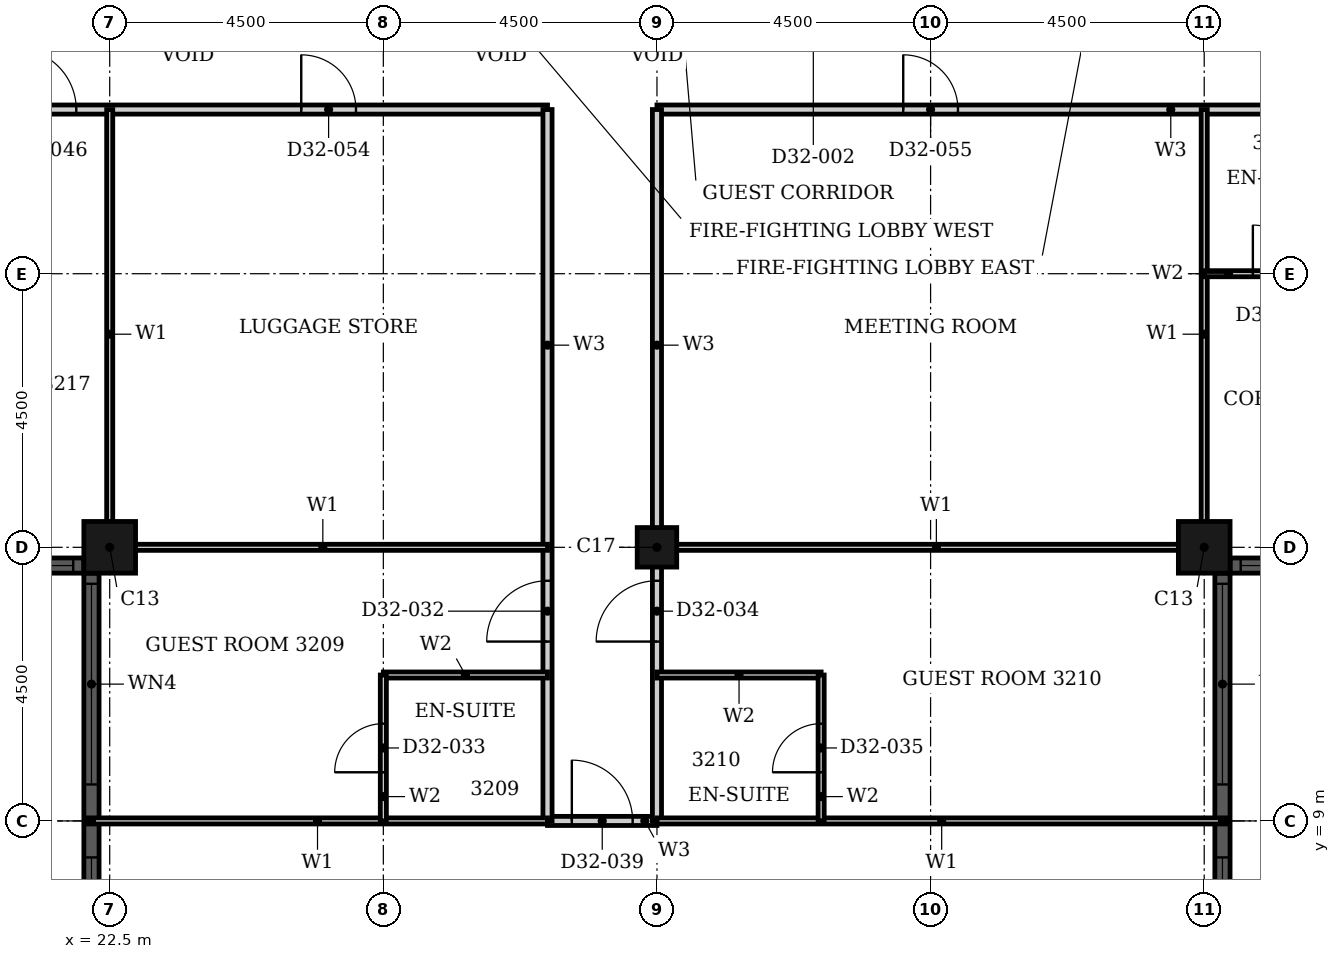
"""IFC4 building model, lengths in metres.
Left out: names, types, materials, properties, quantities, classifications, styles, units other than length and angle.
Written with IfcOpenShell. Run it as: python <this file> out.ifc"""

import sys

from ifc_helpers import new_model, si_unit, direction, frame, frame_2d, origin, origin_2d, place, context, subcontext, project, spatial, rectangle, hollow_rectangle, extrude, element, fill, save


model = new_model("IFC4")
c1 = context("Model", 3, precision=1e-05, world=origin(), true_north=direction((0.0, 1.0)))
c2 = subcontext(c1, "Body", "Model", "MODEL_VIEW")
j1 = project(units=[si_unit("LENGTHUNIT", "METRE"), si_unit("PLANEANGLEUNIT", "RADIAN")], contexts=[c1])
p1 = place(None, origin())
s1 = spatial("IfcSite", under=j1, at=p1, CompositionType="ELEMENT")
p2 = place(p1, origin())
s2 = spatial("IfcBuilding", under=s1, at=p2, CompositionType="ELEMENT")
p3 = place(p2, frame((0.0, 0.0, 129.6)))
s3 = spatial("IfcBuildingStorey", under=s2, at=p3, CompositionType="ELEMENT", Elevation=129.6)
for number, where, z_axis, x_axis in (
    (1, (40.5, 13.5, 0.0), (0.0, 0.0, 1.0), (1.0, 0.0, 0.0)),
    (2, (22.5, 13.5, 0.0), (0.0, 0.0, 1.0), (1.0, 0.0, 0.0)),
):
    element("IfcColumn", number, at=place(p3, frame(where, z_axis=z_axis, x_axis=x_axis)), inside=s3, PredefinedType="COLUMN", context=c2, shape_type="SweptSolid", body=[
        extrude(hollow_rectangle(XDim=0.85, YDim=0.85, WallThickness=0.026, at=origin_2d()), origin(), (0.0, 0.0, 1.0), 3.6),
    ])
p4 = place(p3, frame((31.5, 13.5, 0.0), z_axis=(0.0, 0.0, 1.0), x_axis=(1.0, 0.0, 0.0)))
e3 = element("IfcColumn", 3, at=p4, inside=s3, PredefinedType="COLUMN", context=c2, shape_type="SweptSolid", body=[
    extrude(hollow_rectangle(XDim=0.65, YDim=0.65, WallThickness=0.021, at=origin_2d()), origin(), (0.0, 0.0, 1.0), 3.6),
])
p5 = place(p3, frame((40.8, 4.925, 0.0), z_axis=(0.0, 0.0, 1.0), x_axis=(0.0, 1.0, 0.0)))
e4 = element("IfcWall", 4, at=p5, inside=s3, PredefinedType="SOLIDWALL", context=c2, shape_type="SweptSolid", body=[
    extrude(rectangle(XDim=8.15, YDim=0.25, at=frame_2d((4.075, 0.0))), origin(), (0.0, 0.0, 1.0), 3.6),
])
p6 = place(p5, frame((0.175, 0.0, 0.9)))
e5 = element("IfcOpeningElement", 5, at=p6, cuts=e4, PredefinedType="OPENING", context=c2, shape_type="SweptSolid", body=[
    extrude(rectangle(XDim=3.3, YDim=2.08, at=frame_2d((1.65, 1.04))), frame((0.0, 0.135, 0.0), z_axis=(0.0, -1.0, 0.0), x_axis=(1.0, 0.0, 0.0)), (0.0, 0.0, 1.0), 0.27),
])
p7 = place(p5, frame((4.675, 0.0, 0.9)))
e6 = element("IfcOpeningElement", 6, at=p7, cuts=e4, PredefinedType="OPENING", context=c2, shape_type="SweptSolid", body=[
    extrude(rectangle(XDim=3.3, YDim=2.08, at=frame_2d((1.65, 1.04))), frame((0.0, 0.135, 0.0), z_axis=(0.0, -1.0, 0.0), x_axis=(1.0, 0.0, 0.0)), (0.0, 0.0, 1.0), 0.27),
])
p8 = place(p3, frame((40.925, 13.2, 0.0), z_axis=(0.0, 0.0, 1.0), x_axis=(1.0, 0.0, 0.0)))
e7 = element("IfcWall", 7, at=p8, inside=s3, PredefinedType="SOLIDWALL", context=c2, shape_type="SweptSolid", body=[
    extrude(rectangle(XDim=3.65, YDim=0.25, at=frame_2d((1.825, 0.0))), origin(), (0.0, 0.0, 1.0), 3.6),
])
p9 = place(p8, frame((0.175, 0.0, 0.9)))
e8 = element("IfcOpeningElement", 8, at=p9, cuts=e7, PredefinedType="OPENING", context=c2, shape_type="SweptSolid", body=[
    extrude(rectangle(XDim=3.3, YDim=2.08, at=frame_2d((1.65, 1.04))), frame((0.0, 0.135, 0.0), z_axis=(0.0, -1.0, 0.0), x_axis=(1.0, 0.0, 0.0)), (0.0, 0.0, 1.0), 0.27),
])
p10 = place(p3, frame((18.425, 13.2, 0.0), z_axis=(0.0, 0.0, 1.0), x_axis=(1.0, 0.0, 0.0)))
e9 = element("IfcWall", 9, at=p10, inside=s3, PredefinedType="SOLIDWALL", context=c2, shape_type="SweptSolid", body=[
    extrude(rectangle(XDim=3.65, YDim=0.25, at=frame_2d((1.825, 0.0))), origin(), (0.0, 0.0, 1.0), 3.6),
])
p11 = place(p10, frame((0.175, 0.0, 0.9)))
e10 = element("IfcOpeningElement", 10, at=p11, cuts=e9, PredefinedType="OPENING", context=c2, shape_type="SweptSolid", body=[
    extrude(rectangle(XDim=3.3, YDim=2.08, at=frame_2d((1.65, 1.04))), frame((0.0, 0.135, 0.0), z_axis=(0.0, -1.0, 0.0), x_axis=(1.0, 0.0, 0.0)), (0.0, 0.0, 1.0), 0.27),
])
p12 = place(p3, frame((22.2, 13.075, 0.0), z_axis=(0.0, 0.0, 1.0), x_axis=(0.0, -1.0, 0.0)))
e11 = element("IfcWall", 11, at=p12, inside=s3, PredefinedType="SOLIDWALL", context=c2, shape_type="SweptSolid", body=[
    extrude(rectangle(XDim=8.15, YDim=0.25, at=frame_2d((4.075, 0.0))), origin(), (0.0, 0.0, 1.0), 3.6),
])
p13 = place(p12, frame((0.175, 0.0, 0.9)))
e12 = element("IfcOpeningElement", 12, at=p13, cuts=e11, PredefinedType="OPENING", context=c2, shape_type="SweptSolid", body=[
    extrude(rectangle(XDim=3.3, YDim=2.08, at=frame_2d((1.65, 1.04))), frame((0.0, 0.135, 0.0), z_axis=(0.0, -1.0, 0.0), x_axis=(1.0, 0.0, 0.0)), (0.0, 0.0, 1.0), 0.27),
])
p14 = place(p12, frame((4.675, 0.0, 0.9)))
e13 = element("IfcOpeningElement", 13, at=p14, cuts=e11, PredefinedType="OPENING", context=c2, shape_type="SweptSolid", body=[
    extrude(rectangle(XDim=3.3, YDim=2.08, at=frame_2d((1.65, 1.04))), frame((0.0, 0.135, 0.0), z_axis=(0.0, -1.0, 0.0), x_axis=(1.0, 0.0, 0.0)), (0.0, 0.0, 1.0), 0.27),
])
p15 = place(p3, frame((16.2, 20.7, 0.0), z_axis=(0.0, 0.0, 1.0), x_axis=(1.0, 0.0, 0.0)))
e14 = element("IfcWall", 14, at=p15, inside=s3, PredefinedType="PARTITIONING", context=c2, shape_type="SweptSolid", body=[
    extrude(rectangle(XDim=13.5, YDim=0.15, at=frame_2d((6.75, 0.0))), origin(), (0.0, 0.0, 1.0), 3.3),
])
p16 = place(p15, frame((4.75, 0.0, 0.0)))
e15 = element("IfcOpeningElement", 15, at=p16, cuts=e14, PredefinedType="OPENING", context=c2, shape_type="SweptSolid", body=[
    extrude(rectangle(XDim=1.0, YDim=2.1, at=frame_2d((0.5, 1.05))), frame((0.0, 0.085, 0.0), z_axis=(0.0, -1.0, 0.0), x_axis=(1.0, 0.0, 0.0)), (0.0, 0.0, 1.0), 0.17),
])
p17 = place(p15, frame((9.45, 0.0, 0.0)))
e16 = element("IfcOpeningElement", 16, at=p17, cuts=e14, PredefinedType="OPENING", context=c2, shape_type="SweptSolid", body=[
    extrude(rectangle(XDim=0.9, YDim=2.1, at=frame_2d((0.45, 1.05))), frame((0.0, 0.085, 0.0), z_axis=(0.0, -1.0, 0.0), x_axis=(1.0, 0.0, 0.0)), (0.0, 0.0, 1.0), 0.17),
])
p18 = place(p3, frame((31.5, 20.7, 0.0), z_axis=(0.0, 0.0, 1.0), x_axis=(1.0, 0.0, 0.0)))
e17 = element("IfcWall", 17, at=p18, inside=s3, PredefinedType="PARTITIONING", context=c2, shape_type="SweptSolid", body=[
    extrude(rectangle(XDim=15.3, YDim=0.15, at=frame_2d((7.65, 0.0))), origin(), (0.0, 0.0, 1.0), 3.3),
])
p19 = place(p18, frame((11.95, 0.0, 0.0)))
e18 = element("IfcOpeningElement", 18, at=p19, cuts=e17, PredefinedType="OPENING", context=c2, shape_type="SweptSolid", body=[
    extrude(rectangle(XDim=1.0, YDim=2.1, at=frame_2d((0.5, 1.05))), frame((0.0, 0.085, 0.0), z_axis=(0.0, -1.0, 0.0), x_axis=(1.0, 0.0, 0.0)), (0.0, 0.0, 1.0), 0.17),
])
p20 = place(p18, frame((4.05, 0.0, 0.0)))
e19 = element("IfcOpeningElement", 19, at=p20, cuts=e17, PredefinedType="OPENING", context=c2, shape_type="SweptSolid", body=[
    extrude(rectangle(XDim=0.9, YDim=2.1, at=frame_2d((0.45, 1.05))), frame((0.0, 0.085, 0.0), z_axis=(0.0, -1.0, 0.0), x_axis=(1.0, 0.0, 0.0)), (0.0, 0.0, 1.0), 0.17),
])
p21 = place(p3, frame((29.7, 9.0, 0.0), z_axis=(0.0, 0.0, 1.0), x_axis=(1.0, 0.0, 0.0)))
e20 = element("IfcWall", 20, at=p21, inside=s3, PredefinedType="PARTITIONING", context=c2, shape_type="SweptSolid", body=[
    extrude(rectangle(XDim=1.8, YDim=0.15, at=frame_2d((0.9, 0.0))), origin(), (0.0, 0.0, 1.0), 3.3),
])
p22 = place(p21, frame((0.4, 0.0, 0.0)))
e21 = element("IfcOpeningElement", 21, at=p22, cuts=e20, PredefinedType="OPENING", context=c2, shape_type="SweptSolid", body=[
    extrude(rectangle(XDim=1.0, YDim=2.1, at=frame_2d((0.5, 1.05))), frame((0.0, 0.085, 0.0), z_axis=(0.0, -1.0, 0.0), x_axis=(1.0, 0.0, 0.0)), (0.0, 0.0, 1.0), 0.17),
])
p23 = place(p3, frame((29.7, 9.0, 0.0), z_axis=(0.0, 0.0, 1.0), x_axis=(0.0, 1.0, 0.0)))
e22 = element("IfcWall", 22, at=p23, inside=s3, PredefinedType="PARTITIONING", context=c2, shape_type="SweptSolid", body=[
    extrude(rectangle(XDim=11.7, YDim=0.15, at=frame_2d((5.85, 0.0))), origin(), (0.0, 0.0, 1.0), 3.3),
])
p24 = place(p23, frame((2.95, 0.0, 0.0)))
e23 = element("IfcOpeningElement", 23, at=p24, cuts=e22, PredefinedType="OPENING", context=c2, shape_type="SweptSolid", body=[
    extrude(rectangle(XDim=1.0, YDim=2.1, at=frame_2d((0.5, 1.05))), frame((0.0, 0.085, 0.0), z_axis=(0.0, -1.0, 0.0), x_axis=(1.0, 0.0, 0.0)), (0.0, 0.0, 1.0), 0.17),
])
p25 = place(p3, frame((31.5, 9.0, 0.0), z_axis=(0.0, 0.0, 1.0), x_axis=(0.0, 1.0, 0.0)))
e24 = element("IfcWall", 24, at=p25, inside=s3, PredefinedType="PARTITIONING", context=c2, shape_type="SweptSolid", body=[
    extrude(rectangle(XDim=11.7, YDim=0.15, at=frame_2d((5.85, 0.0))), origin(), (0.0, 0.0, 1.0), 2.58),
])
p26 = place(p25, frame((2.95, 0.0, 0.0)))
e25 = element("IfcOpeningElement", 25, at=p26, cuts=e24, PredefinedType="OPENING", context=c2, shape_type="SweptSolid", body=[
    extrude(rectangle(XDim=1.0, YDim=2.1, at=frame_2d((0.5, 1.05))), frame((0.0, 0.085, 0.0), z_axis=(0.0, -1.0, 0.0), x_axis=(1.0, 0.0, 0.0)), (0.0, 0.0, 1.0), 0.17),
])
p27 = place(p3, frame((31.5, 13.5, 0.0), z_axis=(0.0, 0.0, 1.0), x_axis=(1.0, 0.0, 0.0)))
e26 = element("IfcWall", 26, at=p27, inside=s3, PredefinedType="PARTITIONING", context=c2, shape_type="SweptSolid", body=[
    extrude(rectangle(XDim=9.19, YDim=0.1, at=frame_2d((4.595, 0.0))), origin(), (0.0, 0.0, 1.0), 2.38),
])
p28 = place(p3, frame((22.31, 13.5, 0.0), z_axis=(0.0, 0.0, 1.0), x_axis=(1.0, 0.0, 0.0)))
e27 = element("IfcWall", 27, at=p28, inside=s3, PredefinedType="PARTITIONING", context=c2, shape_type="SweptSolid", body=[
    extrude(rectangle(XDim=7.39, YDim=0.1, at=frame_2d((3.695, 0.0))), origin(), (0.0, 0.0, 1.0), 2.38),
])
p29 = place(p3, frame((31.5, 9.0, 0.0), z_axis=(0.0, 0.0, 1.0), x_axis=(1.0, 0.0, 0.0)))
e28 = element("IfcWall", 28, at=p29, inside=s3, PredefinedType="PARTITIONING", context=c2, shape_type="SweptSolid", body=[
    extrude(rectangle(XDim=9.365, YDim=0.1, at=frame_2d((4.683, 0.0))), origin(), (0.0, 0.0, 1.0), 3.3),
])
p30 = place(p3, frame((22.135, 9.0, 0.0), z_axis=(0.0, 0.0, 1.0), x_axis=(1.0, 0.0, 0.0)))
e29 = element("IfcWall", 29, at=p30, inside=s3, PredefinedType="PARTITIONING", context=c2, shape_type="SweptSolid", body=[
    extrude(rectangle(XDim=7.565, YDim=0.1, at=frame_2d((3.782, 0.0))), origin(), (0.0, 0.0, 1.0), 3.3),
])
for number, where, z_axis, x_axis in (
    (30, (22.5, 13.31, 0.0), (0.0, 0.0, 1.0), (0.0, 1.0, 0.0)),
    (31, (40.5, 13.31, 0.0), (0.0, 0.0, 1.0), (0.0, 1.0, 0.0)),
):
    element("IfcWall", number, at=place(p3, frame(where, z_axis=z_axis, x_axis=x_axis)), inside=s3, PredefinedType="PARTITIONING", context=c2, shape_type="SweptSolid", body=[
        extrude(rectangle(XDim=7.39, YDim=0.1, at=frame_2d((3.695, 0.0))), origin(), (0.0, 0.0, 1.0), 3.3),
    ])
for number, where, z_axis, x_axis in (
    (32, (31.5, 11.4, 0.0), (0.0, 0.0, 1.0), (1.0, 0.0, 0.0)),
    (33, (27.0, 11.4, 0.0), (0.0, 0.0, 1.0), (1.0, 0.0, 0.0)),
):
    element("IfcWall", number, at=place(p3, frame(where, z_axis=z_axis, x_axis=x_axis)), inside=s3, PredefinedType="PARTITIONING", context=c2, shape_type="SweptSolid", body=[
        extrude(rectangle(XDim=2.7, YDim=0.1, at=frame_2d((1.35, 0.0))), origin(), (0.0, 0.0, 1.0), 3.3),
    ])
p31 = place(p3, frame((40.5, 18.0, 0.0), z_axis=(0.0, 0.0, 1.0), x_axis=(1.0, 0.0, 0.0)))
e34 = element("IfcWall", 34, at=p31, inside=s3, PredefinedType="PARTITIONING", context=c2, shape_type="SweptSolid", body=[
    extrude(rectangle(XDim=2.4, YDim=0.1, at=frame_2d((1.2, 0.0))), origin(), (0.0, 0.0, 1.0), 3.3),
])
p32 = place(p31, frame((0.8, 0.0, 0.0)))
e35 = element("IfcOpeningElement", 35, at=p32, cuts=e34, PredefinedType="OPENING", context=c2, shape_type="SweptSolid", body=[
    extrude(rectangle(XDim=0.8, YDim=2.1, at=frame_2d((0.4, 1.05))), frame((0.0, 0.06, 0.0), z_axis=(0.0, -1.0, 0.0), x_axis=(1.0, 0.0, 0.0)), (0.0, 0.0, 1.0), 0.12),
])
p33 = place(p3, frame((27.0, 9.0, 0.0), z_axis=(0.0, 0.0, 1.0), x_axis=(0.0, 1.0, 0.0)))
e36 = element("IfcWall", 36, at=p33, inside=s3, PredefinedType="PARTITIONING", context=c2, shape_type="SweptSolid", body=[
    extrude(rectangle(XDim=2.4, YDim=0.1, at=frame_2d((1.2, 0.0))), origin(), (0.0, 0.0, 1.0), 2.58),
])
p34 = place(p33, frame((0.8, 0.0, 0.0)))
e37 = element("IfcOpeningElement", 37, at=p34, cuts=e36, PredefinedType="OPENING", context=c2, shape_type="SweptSolid", body=[
    extrude(rectangle(XDim=0.8, YDim=2.1, at=frame_2d((0.4, 1.05))), frame((0.0, 0.06, 0.0), z_axis=(0.0, -1.0, 0.0), x_axis=(1.0, 0.0, 0.0)), (0.0, 0.0, 1.0), 0.12),
])
p35 = place(p3, frame((34.2, 9.0, 0.0), z_axis=(0.0, 0.0, 1.0), x_axis=(0.0, 1.0, 0.0)))
e38 = element("IfcWall", 38, at=p35, inside=s3, PredefinedType="PARTITIONING", context=c2, shape_type="SweptSolid", body=[
    extrude(rectangle(XDim=2.4, YDim=0.1, at=frame_2d((1.2, 0.0))), origin(), (0.0, 0.0, 1.0), 3.3),
])
p36 = place(p35, frame((0.8, 0.0, 0.0)))
e39 = element("IfcOpeningElement", 39, at=p36, cuts=e38, PredefinedType="OPENING", context=c2, shape_type="SweptSolid", body=[
    extrude(rectangle(XDim=0.8, YDim=2.1, at=frame_2d((0.4, 1.05))), frame((0.0, 0.06, 0.0), z_axis=(0.0, -1.0, 0.0), x_axis=(1.0, 0.0, 0.0)), (0.0, 0.0, 1.0), 0.12),
])
p37 = place(p6, origin())
e40 = element("IfcWindow", 40, at=p37, inside=s3, PartitioningType="SINGLE_PANEL", PredefinedType="WINDOW", context=c2, shape_type="SweptSolid", body=[
    extrude(rectangle(XDim=3.3, YDim=2.08, at=frame_2d((1.65, 1.04))), frame((0.0, 0.03, 0.0), z_axis=(0.0, -1.0, 0.0), x_axis=(1.0, 0.0, 0.0)), (0.0, 0.0, 1.0), 0.06),
])
fill(e5, e40)
p38 = place(p7, origin())
e41 = element("IfcWindow", 41, at=p38, inside=s3, PartitioningType="SINGLE_PANEL", PredefinedType="WINDOW", context=c2, shape_type="SweptSolid", body=[
    extrude(rectangle(XDim=3.3, YDim=2.08, at=frame_2d((1.65, 1.04))), frame((0.0, 0.03, 0.0), z_axis=(0.0, -1.0, 0.0), x_axis=(1.0, 0.0, 0.0)), (0.0, 0.0, 1.0), 0.06),
])
fill(e6, e41)
p39 = place(p9, origin())
e42 = element("IfcWindow", 42, at=p39, inside=s3, PartitioningType="SINGLE_PANEL", PredefinedType="WINDOW", context=c2, shape_type="SweptSolid", body=[
    extrude(rectangle(XDim=3.3, YDim=2.08, at=frame_2d((1.65, 1.04))), frame((0.0, 0.03, 0.0), z_axis=(0.0, -1.0, 0.0), x_axis=(1.0, 0.0, 0.0)), (0.0, 0.0, 1.0), 0.06),
])
fill(e8, e42)
p40 = place(p11, origin())
e43 = element("IfcWindow", 43, at=p40, inside=s3, PartitioningType="SINGLE_PANEL", PredefinedType="WINDOW", context=c2, shape_type="SweptSolid", body=[
    extrude(rectangle(XDim=3.3, YDim=2.08, at=frame_2d((1.65, 1.04))), frame((0.0, 0.03, 0.0), z_axis=(0.0, -1.0, 0.0), x_axis=(1.0, 0.0, 0.0)), (0.0, 0.0, 1.0), 0.06),
])
fill(e10, e43)
p41 = place(p13, origin())
e44 = element("IfcWindow", 44, at=p41, inside=s3, PartitioningType="SINGLE_PANEL", PredefinedType="WINDOW", context=c2, shape_type="SweptSolid", body=[
    extrude(rectangle(XDim=3.3, YDim=2.08, at=frame_2d((1.65, 1.04))), frame((0.0, 0.03, 0.0), z_axis=(0.0, -1.0, 0.0), x_axis=(1.0, 0.0, 0.0)), (0.0, 0.0, 1.0), 0.06),
])
fill(e12, e44)
p42 = place(p14, origin())
e45 = element("IfcWindow", 45, at=p42, inside=s3, PartitioningType="SINGLE_PANEL", PredefinedType="WINDOW", context=c2, shape_type="SweptSolid", body=[
    extrude(rectangle(XDim=3.3, YDim=2.08, at=frame_2d((1.65, 1.04))), frame((0.0, 0.03, 0.0), z_axis=(0.0, -1.0, 0.0), x_axis=(1.0, 0.0, 0.0)), (0.0, 0.0, 1.0), 0.06),
])
fill(e13, e45)
p43 = place(p24, origin())
e46 = element("IfcDoor", 46, at=p43, inside=s3, OperationType="SINGLE_SWING_RIGHT", PredefinedType="DOOR", context=c2, shape_type="SweptSolid", body=[
    extrude(rectangle(XDim=1.0, YDim=2.1, at=frame_2d((0.5, 1.05))), frame((0.0, 0.025, 0.0), z_axis=(0.0, -1.0, 0.0), x_axis=(1.0, 0.0, 0.0)), (0.0, 0.0, 1.0), 0.05),
])
fill(e23, e46)
p44 = place(p34, origin())
e47 = element("IfcDoor", 47, at=p44, inside=s3, OperationType="SINGLE_SWING_RIGHT", PredefinedType="DOOR", context=c2, shape_type="SweptSolid", body=[
    extrude(rectangle(XDim=0.8, YDim=2.1, at=frame_2d((0.4, 1.05))), frame((0.0, 0.025, 0.0), z_axis=(0.0, -1.0, 0.0), x_axis=(1.0, 0.0, 0.0)), (0.0, 0.0, 1.0), 0.05),
])
fill(e37, e47)
p45 = place(p26, origin())
e48 = element("IfcDoor", 48, at=p45, inside=s3, OperationType="SINGLE_SWING_RIGHT", PredefinedType="DOOR", context=c2, shape_type="SweptSolid", body=[
    extrude(rectangle(XDim=1.0, YDim=2.1, at=frame_2d((0.5, 1.05))), frame((0.0, 0.025, 0.0), z_axis=(0.0, -1.0, 0.0), x_axis=(1.0, 0.0, 0.0)), (0.0, 0.0, 1.0), 0.05),
])
fill(e25, e48)
p46 = place(p36, origin())
e49 = element("IfcDoor", 49, at=p46, inside=s3, OperationType="SINGLE_SWING_LEFT", PredefinedType="DOOR", context=c2, shape_type="SweptSolid", body=[
    extrude(rectangle(XDim=0.8, YDim=2.1, at=frame_2d((0.4, 1.05))), frame((0.0, 0.025, 0.0), z_axis=(0.0, -1.0, 0.0), x_axis=(1.0, 0.0, 0.0)), (0.0, 0.0, 1.0), 0.05),
])
fill(e39, e49)
p47 = place(p22, origin())
e50 = element("IfcDoor", 50, at=p47, inside=s3, OperationType="SINGLE_SWING_RIGHT", PredefinedType="DOOR", context=c2, shape_type="SweptSolid", body=[
    extrude(rectangle(XDim=1.0, YDim=2.1, at=frame_2d((0.5, 1.05))), frame((0.0, 0.025, 0.0), z_axis=(0.0, -1.0, 0.0), x_axis=(1.0, 0.0, 0.0)), (0.0, 0.0, 1.0), 0.05),
])
fill(e21, e50)
p48 = place(p16, origin())
e51 = element("IfcDoor", 51, at=p48, inside=s3, OperationType="SINGLE_SWING_RIGHT", PredefinedType="DOOR", context=c2, shape_type="SweptSolid", body=[
    extrude(rectangle(XDim=1.0, YDim=2.1, at=frame_2d((0.5, 1.05))), frame((0.0, 0.025, 0.0), z_axis=(0.0, -1.0, 0.0), x_axis=(1.0, 0.0, 0.0)), (0.0, 0.0, 1.0), 0.05),
])
fill(e15, e51)
p49 = place(p32, origin())
e52 = element("IfcDoor", 52, at=p49, inside=s3, OperationType="SINGLE_SWING_LEFT", PredefinedType="DOOR", context=c2, shape_type="SweptSolid", body=[
    extrude(rectangle(XDim=0.8, YDim=2.1, at=frame_2d((0.4, 1.05))), frame((0.0, 0.025, 0.0), z_axis=(0.0, -1.0, 0.0), x_axis=(1.0, 0.0, 0.0)), (0.0, 0.0, 1.0), 0.05),
])
fill(e35, e52)
p50 = place(p17, origin())
e53 = element("IfcDoor", 53, at=p50, inside=s3, OperationType="SINGLE_SWING_LEFT", PredefinedType="DOOR", context=c2, shape_type="SweptSolid", body=[
    extrude(rectangle(XDim=0.9, YDim=2.1, at=frame_2d((0.45, 1.05))), frame((0.0, 0.025, 0.0), z_axis=(0.0, -1.0, 0.0), x_axis=(1.0, 0.0, 0.0)), (0.0, 0.0, 1.0), 0.05),
])
fill(e16, e53)
p51 = place(p20, origin())
e54 = element("IfcDoor", 54, at=p51, inside=s3, OperationType="SINGLE_SWING_LEFT", PredefinedType="DOOR", context=c2, shape_type="SweptSolid", body=[
    extrude(rectangle(XDim=0.9, YDim=2.1, at=frame_2d((0.45, 1.05))), frame((0.0, 0.025, 0.0), z_axis=(0.0, -1.0, 0.0), x_axis=(1.0, 0.0, 0.0)), (0.0, 0.0, 1.0), 0.05),
])
fill(e19, e54)
save(model, sys.argv[1])
